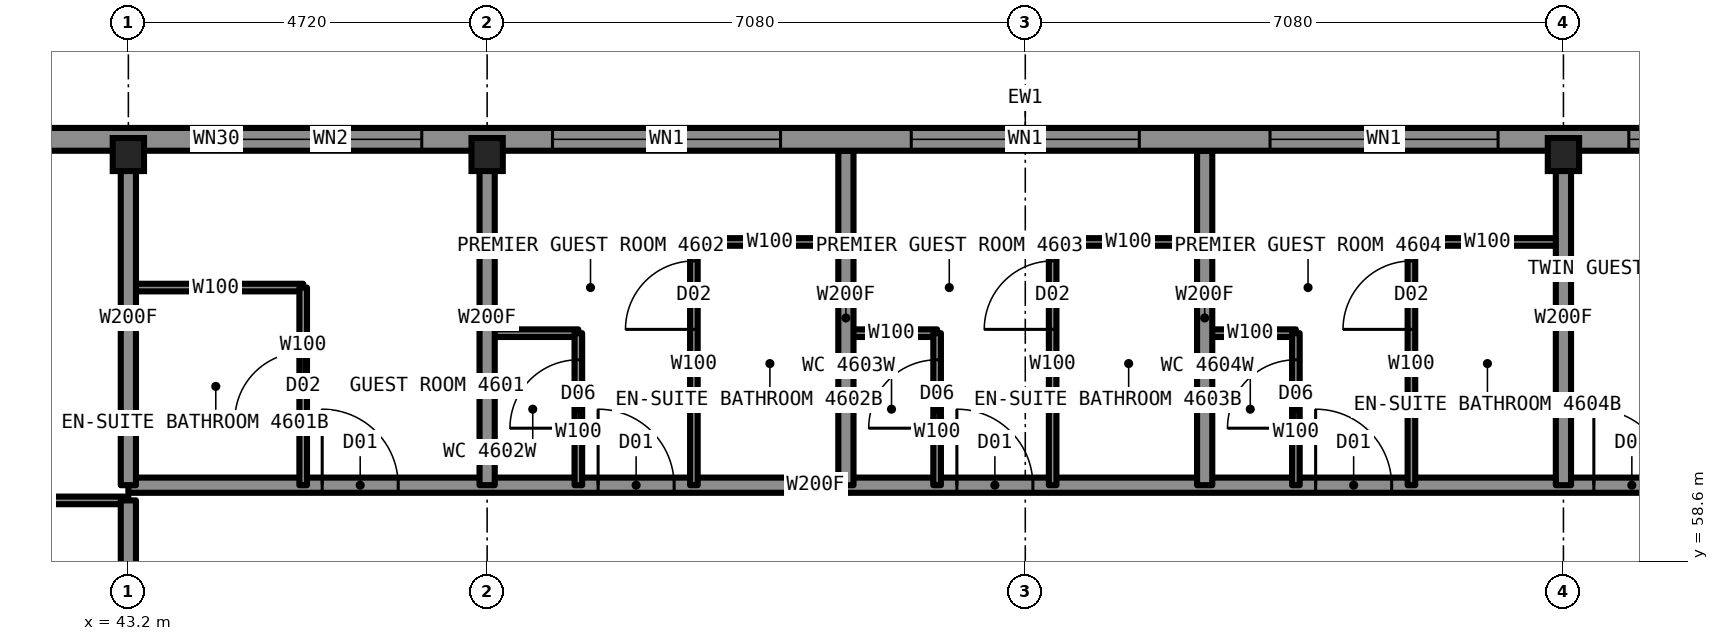
"""IFC4 building model, lengths in metres.
Left out: names, types, materials, properties, quantities, classifications, styles, units other than length and angle.
Written with IfcOpenShell. Run it as: python <this file> out.ifc"""

import sys

from ifc_helpers import new_model, si_unit, direction, frame, frame_2d, origin, origin_2d, place, context, subcontext, project, spatial, rectangle, i_section, extrude, element, fill, save


model = new_model("IFC4")
c1 = context("Model", 3, precision=1e-05, world=origin(), true_north=direction((0.0, 1.0)))
c2 = subcontext(c1, "Body", "Model", "MODEL_VIEW")
j1 = project(units=[si_unit("LENGTHUNIT", "METRE"), si_unit("PLANEANGLEUNIT", "RADIAN")], contexts=[c1])
p1 = place(None, origin())
s1 = spatial("IfcSite", under=j1, at=p1, CompositionType="ELEMENT")
p2 = place(p1, origin())
s2 = spatial("IfcBuilding", under=s1, at=p2, CompositionType="ELEMENT")
p3 = place(p2, frame((0.0, 0.0, 172.3)))
s3 = spatial("IfcBuildingStorey", under=s2, at=p3, CompositionType="ELEMENT", Elevation=172.3)
for number, where, z_axis, x_axis in (
    (1, (43.2, 63.95, 0.0), (0.0, 0.0, 1.0), (1.0, 0.0, 0.0)),
    (2, (47.92, 63.95, 0.0), (0.0, 0.0, 1.0), (1.0, 0.0, 0.0)),
    (3, (62.08, 63.95, 0.0), (0.0, 0.0, 1.0), (1.0, 0.0, 0.0)),
):
    element("IfcColumn", number, at=place(p3, frame(where, z_axis=z_axis, x_axis=x_axis)), inside=s3, PredefinedType="COLUMN", context=c2, shape_type="SweptSolid", body=[
        extrude(i_section(OverallWidth=0.411, OverallDepth=0.434, WebThickness=0.036, FlangeThickness=0.057, at=origin_2d()), origin(), (0.0, 0.0, 1.0), 3.5),
    ])
p4 = place(p3, frame((40.6, 59.4, 0.0), z_axis=(0.0, 0.0, 1.0), x_axis=(1.0, 0.0, 0.0)))
e4 = element("IfcWall", 4, at=p4, inside=s3, PredefinedType="PARTITIONING", context=c2, shape_type="SweptSolid", body=[
    extrude(rectangle(XDim=2.6, YDim=0.1, at=frame_2d((1.3, 0.0))), origin(), (0.0, 0.0, 1.0), 3.33),
])
p5 = place(p3, frame((43.2, 59.6, 0.0), z_axis=(0.0, 0.0, 1.0), x_axis=(1.0, 0.0, 0.0)))
e5 = element("IfcWall", 5, at=p5, inside=s3, PredefinedType="PARTITIONING", context=c2, shape_type="SweptSolid", body=[
    extrude(rectangle(XDim=23.6, YDim=0.2, at=frame_2d((11.8, 0.0))), origin(), (0.0, 0.0, 1.0), 3.33),
])
p6 = place(p5, frame((2.55, 0.0, 0.0)))
e6 = element("IfcOpeningElement", 6, at=p6, cuts=e5, PredefinedType="OPENING", context=c2, shape_type="SweptSolid", body=[
    extrude(rectangle(XDim=1.0, YDim=2.2, at=frame_2d((0.5, 1.1))), frame((0.0, 0.11, 0.0), z_axis=(0.0, -1.0, 0.0), x_axis=(1.0, 0.0, 0.0)), (0.0, 0.0, 1.0), 0.22),
])
p7 = place(p5, frame((6.18, 0.0, 0.0)))
e7 = element("IfcOpeningElement", 7, at=p7, cuts=e5, PredefinedType="OPENING", context=c2, shape_type="SweptSolid", body=[
    extrude(rectangle(XDim=1.0, YDim=2.2, at=frame_2d((0.5, 1.1))), frame((0.0, 0.11, 0.0), z_axis=(0.0, -1.0, 0.0), x_axis=(1.0, 0.0, 0.0)), (0.0, 0.0, 1.0), 0.22),
])
p8 = place(p5, frame((10.9, 0.0, 0.0)))
e8 = element("IfcOpeningElement", 8, at=p8, cuts=e5, PredefinedType="OPENING", context=c2, shape_type="SweptSolid", body=[
    extrude(rectangle(XDim=1.0, YDim=2.2, at=frame_2d((0.5, 1.1))), frame((0.0, 0.11, 0.0), z_axis=(0.0, -1.0, 0.0), x_axis=(1.0, 0.0, 0.0)), (0.0, 0.0, 1.0), 0.22),
])
p9 = place(p5, frame((15.62, 0.0, 0.0)))
e9 = element("IfcOpeningElement", 9, at=p9, cuts=e5, PredefinedType="OPENING", context=c2, shape_type="SweptSolid", body=[
    extrude(rectangle(XDim=1.0, YDim=2.2, at=frame_2d((0.5, 1.1))), frame((0.0, 0.11, 0.0), z_axis=(0.0, -1.0, 0.0), x_axis=(1.0, 0.0, 0.0)), (0.0, 0.0, 1.0), 0.22),
])
p10 = place(p5, frame((19.28, 0.0, 0.0)))
e10 = element("IfcOpeningElement", 10, at=p10, cuts=e5, PredefinedType="OPENING", context=c2, shape_type="SweptSolid", body=[
    extrude(rectangle(XDim=1.0, YDim=2.2, at=frame_2d((0.5, 1.1))), frame((0.0, 0.11, 0.0), z_axis=(0.0, -1.0, 0.0), x_axis=(1.0, 0.0, 0.0)), (0.0, 0.0, 1.0), 0.22),
])
for number, where, z_axis, x_axis in (
    (11, (47.92, 61.6, 0.0), (0.0, 0.0, 1.0), (1.0, 0.0, 0.0)),
    (12, (52.64, 61.6, 0.0), (0.0, 0.0, 1.0), (1.0, 0.0, 0.0)),
):
    element("IfcWall", number, at=place(p3, frame(where, z_axis=z_axis, x_axis=x_axis)), inside=s3, PredefinedType="PARTITIONING", context=c2, shape_type="SweptSolid", body=[
        extrude(rectangle(XDim=1.2, YDim=0.1, at=frame_2d((0.6, 0.0))), origin(), (0.0, 0.0, 1.0), 3.33),
    ])
p11 = place(p3, frame((57.36, 61.6, 0.0), z_axis=(0.0, 0.0, 1.0), x_axis=(1.0, 0.0, 0.0)))
e13 = element("IfcWall", 13, at=p11, inside=s3, PredefinedType="PARTITIONING", context=c2, shape_type="SweptSolid", body=[
    extrude(rectangle(XDim=1.2, YDim=0.1, at=frame_2d((0.6, 0.0))), origin(), (0.0, 0.0, 1.0), 3.33),
])
p12 = place(p3, frame((43.2, 62.2, 0.0), z_axis=(0.0, 0.0, 1.0), x_axis=(1.0, 0.0, 0.0)))
e14 = element("IfcWall", 14, at=p12, inside=s3, PredefinedType="PARTITIONING", context=c2, shape_type="SweptSolid", body=[
    extrude(rectangle(XDim=2.3, YDim=0.1, at=frame_2d((1.15, 0.0))), origin(), (0.0, 0.0, 1.0), 3.33),
])
for number, where, z_axis, x_axis in (
    (15, (50.64, 62.8, 0.0), (0.0, 0.0, 1.0), (1.0, 0.0, 0.0)),
    (16, (55.36, 62.8, 0.0), (0.0, 0.0, 1.0), (1.0, 0.0, 0.0)),
    (17, (60.08, 62.8, 0.0), (0.0, 0.0, 1.0), (1.0, 0.0, 0.0)),
):
    element("IfcWall", number, at=place(p3, frame(where, z_axis=z_axis, x_axis=x_axis)), inside=s3, PredefinedType="PARTITIONING", context=c2, shape_type="SweptSolid", body=[
        extrude(rectangle(XDim=2.0, YDim=0.1, at=frame_2d((1.0, 0.0))), origin(), (0.0, 0.0, 1.0), 3.33),
    ])
p13 = place(p3, frame((53.84, 59.6, 0.0), z_axis=(0.0, 0.0, 1.0), x_axis=(0.0, 1.0, 0.0)))
e18 = element("IfcWall", 18, at=p13, inside=s3, PredefinedType="PARTITIONING", context=c2, shape_type="SweptSolid", body=[
    extrude(rectangle(XDim=2.0, YDim=0.1, at=frame_2d((1.0, 0.0))), origin(), (0.0, 0.0, 1.0), 3.33),
])
p14 = place(p13, frame((0.75, 0.0, 0.0)))
e19 = element("IfcOpeningElement", 19, at=p14, cuts=e18, PredefinedType="OPENING", context=c2, shape_type="SweptSolid", body=[
    extrude(rectangle(XDim=0.9, YDim=2.1, at=frame_2d((0.45, 1.05))), frame((0.0, 0.06, 0.0), z_axis=(0.0, -1.0, 0.0), x_axis=(1.0, 0.0, 0.0)), (0.0, 0.0, 1.0), 0.12),
])
p15 = place(p3, frame((43.2, 59.6, 0.0), z_axis=(0.0, 0.0, 1.0), x_axis=(0.0, 1.0, 0.0)))
e20 = element("IfcWall", 20, at=p15, inside=s3, PredefinedType="PARTITIONING", context=c2, shape_type="SweptSolid", body=[
    extrude(rectangle(XDim=4.4, YDim=0.2, at=frame_2d((2.2, 0.0))), origin(), (0.0, 0.0, 1.0), 2.573),
])
p16 = place(p3, frame((52.64, 59.6, 0.0), z_axis=(0.0, 0.0, 1.0), x_axis=(0.0, 1.0, 0.0)))
e21 = element("IfcWall", 21, at=p16, inside=s3, PredefinedType="PARTITIONING", context=c2, shape_type="SweptSolid", body=[
    extrude(rectangle(XDim=4.4, YDim=0.2, at=frame_2d((2.2, 0.0))), origin(), (0.0, 0.0, 1.0), 3.33),
])
p17 = place(p3, frame((50.64, 59.6, 0.0), z_axis=(0.0, 0.0, 1.0), x_axis=(0.0, 1.0, 0.0)))
e22 = element("IfcWall", 22, at=p17, inside=s3, PredefinedType="PARTITIONING", context=c2, shape_type="SweptSolid", body=[
    extrude(rectangle(XDim=3.2, YDim=0.1, at=frame_2d((1.6, 0.0))), origin(), (0.0, 0.0, 1.0), 3.33),
])
p18 = place(p17, frame((2.05, 0.0, 0.0)))
e23 = element("IfcOpeningElement", 23, at=p18, cuts=e22, PredefinedType="OPENING", context=c2, shape_type="SweptSolid", body=[
    extrude(rectangle(XDim=0.9, YDim=2.1, at=frame_2d((0.45, 1.05))), frame((0.0, 0.06, 0.0), z_axis=(0.0, -1.0, 0.0), x_axis=(1.0, 0.0, 0.0)), (0.0, 0.0, 1.0), 0.12),
])
p19 = place(p3, frame((49.12, 59.6, 0.0), z_axis=(0.0, 0.0, 1.0), x_axis=(0.0, 1.0, 0.0)))
e24 = element("IfcWall", 24, at=p19, inside=s3, PredefinedType="PARTITIONING", context=c2, shape_type="SweptSolid", body=[
    extrude(rectangle(XDim=2.0, YDim=0.1, at=frame_2d((1.0, 0.0))), origin(), (0.0, 0.0, 1.0), 3.33),
])
p20 = place(p19, frame((0.75, 0.0, 0.0)))
e25 = element("IfcOpeningElement", 25, at=p20, cuts=e24, PredefinedType="OPENING", context=c2, shape_type="SweptSolid", body=[
    extrude(rectangle(XDim=0.9, YDim=2.1, at=frame_2d((0.45, 1.05))), frame((0.0, 0.06, 0.0), z_axis=(0.0, -1.0, 0.0), x_axis=(1.0, 0.0, 0.0)), (0.0, 0.0, 1.0), 0.12),
])
p21 = place(p3, frame((47.92, 59.6, 0.0), z_axis=(0.0, 0.0, 1.0), x_axis=(0.0, 1.0, 0.0)))
e26 = element("IfcWall", 26, at=p21, inside=s3, PredefinedType="PARTITIONING", context=c2, shape_type="SweptSolid", body=[
    extrude(rectangle(XDim=4.4, YDim=0.2, at=frame_2d((2.2, 0.0))), origin(), (0.0, 0.0, 1.0), 2.573),
])
p22 = place(p3, frame((45.5, 59.6, 0.0), z_axis=(0.0, 0.0, 1.0), x_axis=(0.0, 1.0, 0.0)))
e27 = element("IfcWall", 27, at=p22, inside=s3, PredefinedType="PARTITIONING", context=c2, shape_type="SweptSolid", body=[
    extrude(rectangle(XDim=2.6, YDim=0.1, at=frame_2d((1.3, 0.0))), origin(), (0.0, 0.0, 1.0), 3.33),
])
p23 = place(p22, frame((0.85, 0.0, 0.0)))
e28 = element("IfcOpeningElement", 28, at=p23, cuts=e27, PredefinedType="OPENING", context=c2, shape_type="SweptSolid", body=[
    extrude(rectangle(XDim=0.9, YDim=2.1, at=frame_2d((0.45, 1.05))), frame((0.0, 0.06, 0.0), z_axis=(0.0, -1.0, 0.0), x_axis=(1.0, 0.0, 0.0)), (0.0, 0.0, 1.0), 0.12),
])
p24 = place(p3, frame((55.36, 59.6, 0.0), z_axis=(0.0, 0.0, 1.0), x_axis=(0.0, 1.0, 0.0)))
e29 = element("IfcWall", 29, at=p24, inside=s3, PredefinedType="PARTITIONING", context=c2, shape_type="SweptSolid", body=[
    extrude(rectangle(XDim=3.2, YDim=0.1, at=frame_2d((1.6, 0.0))), origin(), (0.0, 0.0, 1.0), 3.33),
])
p25 = place(p24, frame((2.05, 0.0, 0.0)))
e30 = element("IfcOpeningElement", 30, at=p25, cuts=e29, PredefinedType="OPENING", context=c2, shape_type="SweptSolid", body=[
    extrude(rectangle(XDim=0.9, YDim=2.1, at=frame_2d((0.45, 1.05))), frame((0.0, 0.06, 0.0), z_axis=(0.0, -1.0, 0.0), x_axis=(1.0, 0.0, 0.0)), (0.0, 0.0, 1.0), 0.12),
])
p26 = place(p3, frame((57.36, 59.6, 0.0), z_axis=(0.0, 0.0, 1.0), x_axis=(0.0, 1.0, 0.0)))
e31 = element("IfcWall", 31, at=p26, inside=s3, PredefinedType="PARTITIONING", context=c2, shape_type="SweptSolid", body=[
    extrude(rectangle(XDim=4.4, YDim=0.2, at=frame_2d((2.2, 0.0))), origin(), (0.0, 0.0, 1.0), 3.33),
])
p27 = place(p3, frame((58.56, 59.6, 0.0), z_axis=(0.0, 0.0, 1.0), x_axis=(0.0, 1.0, 0.0)))
e32 = element("IfcWall", 32, at=p27, inside=s3, PredefinedType="PARTITIONING", context=c2, shape_type="SweptSolid", body=[
    extrude(rectangle(XDim=2.0, YDim=0.1, at=frame_2d((1.0, 0.0))), origin(), (0.0, 0.0, 1.0), 3.33),
])
p28 = place(p27, frame((0.75, 0.0, 0.0)))
e33 = element("IfcOpeningElement", 33, at=p28, cuts=e32, PredefinedType="OPENING", context=c2, shape_type="SweptSolid", body=[
    extrude(rectangle(XDim=0.9, YDim=2.1, at=frame_2d((0.45, 1.05))), frame((0.0, 0.06, 0.0), z_axis=(0.0, -1.0, 0.0), x_axis=(1.0, 0.0, 0.0)), (0.0, 0.0, 1.0), 0.12),
])
p29 = place(p3, frame((60.08, 59.6, 0.0), z_axis=(0.0, 0.0, 1.0), x_axis=(0.0, 1.0, 0.0)))
e34 = element("IfcWall", 34, at=p29, inside=s3, PredefinedType="PARTITIONING", context=c2, shape_type="SweptSolid", body=[
    extrude(rectangle(XDim=3.2, YDim=0.1, at=frame_2d((1.6, 0.0))), origin(), (0.0, 0.0, 1.0), 3.33),
])
p30 = place(p29, frame((2.05, 0.0, 0.0)))
e35 = element("IfcOpeningElement", 35, at=p30, cuts=e34, PredefinedType="OPENING", context=c2, shape_type="SweptSolid", body=[
    extrude(rectangle(XDim=0.9, YDim=2.1, at=frame_2d((0.45, 1.05))), frame((0.0, 0.06, 0.0), z_axis=(0.0, -1.0, 0.0), x_axis=(1.0, 0.0, 0.0)), (0.0, 0.0, 1.0), 0.12),
])
p31 = place(p3, frame((62.08, 59.6, 0.0), z_axis=(0.0, 0.0, 1.0), x_axis=(0.0, 1.0, 0.0)))
e36 = element("IfcWall", 36, at=p31, inside=s3, PredefinedType="PARTITIONING", context=c2, shape_type="SweptSolid", body=[
    extrude(rectangle(XDim=4.4, YDim=0.2, at=frame_2d((2.2, 0.0))), origin(), (0.0, 0.0, 1.0), 2.573),
])
p32 = place(p3, frame((68.8, 64.15, 0.0), z_axis=(0.0, 0.0, 1.0), x_axis=(-1.0, 0.0, 0.0)))
e37 = element("IfcWall", 37, at=p32, inside=s3, PredefinedType="SOLIDWALL", context=c2, shape_type="SweptSolid", body=[
    extrude(rectangle(XDim=27.6, YDim=0.3, at=frame_2d((13.8, 0.0))), origin(), (0.0, 0.0, 1.0), 2.83),
])
p33 = place(p32, frame((3.46, 0.0, 0.3)))
e38 = element("IfcOpeningElement", 38, at=p33, cuts=e37, PredefinedType="OPENING", context=c2, shape_type="SweptSolid", body=[
    extrude(rectangle(XDim=2.4, YDim=2.0, at=frame_2d((1.2, 1.0))), frame((0.0, 0.16, 0.0), z_axis=(0.0, -1.0, 0.0), x_axis=(1.0, 0.0, 0.0)), (0.0, 0.0, 1.0), 0.32),
])
p34 = place(p32, frame((7.58, 0.0, 0.3)))
e39 = element("IfcOpeningElement", 39, at=p34, cuts=e37, PredefinedType="OPENING", context=c2, shape_type="SweptSolid", body=[
    extrude(rectangle(XDim=3.0, YDim=2.0, at=frame_2d((1.5, 1.0))), frame((0.0, 0.16, 0.0), z_axis=(0.0, -1.0, 0.0), x_axis=(1.0, 0.0, 0.0)), (0.0, 0.0, 1.0), 0.32),
])
p35 = place(p32, frame((12.3, 0.0, 0.3)))
e40 = element("IfcOpeningElement", 40, at=p35, cuts=e37, PredefinedType="OPENING", context=c2, shape_type="SweptSolid", body=[
    extrude(rectangle(XDim=3.0, YDim=2.0, at=frame_2d((1.5, 1.0))), frame((0.0, 0.16, 0.0), z_axis=(0.0, -1.0, 0.0), x_axis=(1.0, 0.0, 0.0)), (0.0, 0.0, 1.0), 0.32),
])
p36 = place(p32, frame((17.02, 0.0, 0.3)))
e41 = element("IfcOpeningElement", 41, at=p36, cuts=e37, PredefinedType="OPENING", context=c2, shape_type="SweptSolid", body=[
    extrude(rectangle(XDim=3.0, YDim=2.0, at=frame_2d((1.5, 1.0))), frame((0.0, 0.16, 0.0), z_axis=(0.0, -1.0, 0.0), x_axis=(1.0, 0.0, 0.0)), (0.0, 0.0, 1.0), 0.32),
])
p37 = place(p32, frame((21.74, 0.0, 0.3)))
e42 = element("IfcOpeningElement", 42, at=p37, cuts=e37, PredefinedType="OPENING", context=c2, shape_type="SweptSolid", body=[
    extrude(rectangle(XDim=2.4, YDim=2.0, at=frame_2d((1.2, 1.0))), frame((0.0, 0.16, 0.0), z_axis=(0.0, -1.0, 0.0), x_axis=(1.0, 0.0, 0.0)), (0.0, 0.0, 1.0), 0.32),
])
p38 = place(p32, frame((2.86, 0.0, 0.3)))
e43 = element("IfcOpeningElement", 43, at=p38, cuts=e37, PredefinedType="OPENING", context=c2, shape_type="SweptSolid", body=[
    extrude(rectangle(XDim=0.6, YDim=1.1, at=frame_2d((0.3, 0.55))), frame((0.0, 0.16, 0.0), z_axis=(0.0, -1.0, 0.0), x_axis=(1.0, 0.0, 0.0)), (0.0, 0.0, 1.0), 0.32),
])
p39 = place(p32, frame((24.14, 0.0, 0.3)))
e44 = element("IfcOpeningElement", 44, at=p39, cuts=e37, PredefinedType="OPENING", context=c2, shape_type="SweptSolid", body=[
    extrude(rectangle(XDim=0.6, YDim=1.1, at=frame_2d((0.3, 0.55))), frame((0.0, 0.16, 0.0), z_axis=(0.0, -1.0, 0.0), x_axis=(1.0, 0.0, 0.0)), (0.0, 0.0, 1.0), 0.32),
])
p40 = place(p3, frame((43.2, 56.78, 0.0), z_axis=(0.0, 0.0, 1.0), x_axis=(0.0, 1.0, 0.0)))
e45 = element("IfcWall", 45, at=p40, inside=s3, PredefinedType="PARTITIONING", context=c2, shape_type="SweptSolid", body=[
    extrude(rectangle(XDim=2.62, YDim=0.2, at=frame_2d((1.31, 0.0))), origin(), (0.0, 0.0, 1.0), 2.573),
])
p41 = place(p6, origin())
e46 = element("IfcDoor", 46, at=p41, inside=s3, OperationType="SINGLE_SWING_LEFT", PredefinedType="DOOR", context=c2, shape_type="SweptSolid", body=[
    extrude(rectangle(XDim=1.0, YDim=2.2, at=frame_2d((0.5, 1.1))), frame((0.0, 0.025, 0.0), z_axis=(0.0, -1.0, 0.0), x_axis=(1.0, 0.0, 0.0)), (0.0, 0.0, 1.0), 0.05),
])
fill(e6, e46)
p42 = place(p23, origin())
e47 = element("IfcDoor", 47, at=p42, inside=s3, OperationType="SINGLE_SWING_RIGHT", PredefinedType="DOOR", context=c2, shape_type="SweptSolid", body=[
    extrude(rectangle(XDim=0.9, YDim=2.1, at=frame_2d((0.45, 1.05))), frame((0.0, 0.025, 0.0), z_axis=(0.0, -1.0, 0.0), x_axis=(1.0, 0.0, 0.0)), (0.0, 0.0, 1.0), 0.05),
])
fill(e28, e47)
p43 = place(p7, origin())
e48 = element("IfcDoor", 48, at=p43, inside=s3, OperationType="SINGLE_SWING_LEFT", PredefinedType="DOOR", context=c2, shape_type="SweptSolid", body=[
    extrude(rectangle(XDim=1.0, YDim=2.2, at=frame_2d((0.5, 1.1))), frame((0.0, 0.025, 0.0), z_axis=(0.0, -1.0, 0.0), x_axis=(1.0, 0.0, 0.0)), (0.0, 0.0, 1.0), 0.05),
])
fill(e7, e48)
p44 = place(p18, origin())
e49 = element("IfcDoor", 49, at=p44, inside=s3, OperationType="SINGLE_SWING_RIGHT", PredefinedType="DOOR", context=c2, shape_type="SweptSolid", body=[
    extrude(rectangle(XDim=0.9, YDim=2.1, at=frame_2d((0.45, 1.05))), frame((0.0, 0.025, 0.0), z_axis=(0.0, -1.0, 0.0), x_axis=(1.0, 0.0, 0.0)), (0.0, 0.0, 1.0), 0.05),
])
fill(e23, e49)
p45 = place(p20, origin())
e50 = element("IfcDoor", 50, at=p45, inside=s3, OperationType="SINGLE_SWING_LEFT", PredefinedType="DOOR", context=c2, shape_type="SweptSolid", body=[
    extrude(rectangle(XDim=0.9, YDim=2.1, at=frame_2d((0.45, 1.05))), frame((0.0, 0.025, 0.0), z_axis=(0.0, -1.0, 0.0), x_axis=(1.0, 0.0, 0.0)), (0.0, 0.0, 1.0), 0.05),
])
fill(e25, e50)
p46 = place(p8, origin())
e51 = element("IfcDoor", 51, at=p46, inside=s3, OperationType="SINGLE_SWING_LEFT", PredefinedType="DOOR", context=c2, shape_type="SweptSolid", body=[
    extrude(rectangle(XDim=1.0, YDim=2.2, at=frame_2d((0.5, 1.1))), frame((0.0, 0.025, 0.0), z_axis=(0.0, -1.0, 0.0), x_axis=(1.0, 0.0, 0.0)), (0.0, 0.0, 1.0), 0.05),
])
fill(e8, e51)
p47 = place(p25, origin())
e52 = element("IfcDoor", 52, at=p47, inside=s3, OperationType="SINGLE_SWING_RIGHT", PredefinedType="DOOR", context=c2, shape_type="SweptSolid", body=[
    extrude(rectangle(XDim=0.9, YDim=2.1, at=frame_2d((0.45, 1.05))), frame((0.0, 0.025, 0.0), z_axis=(0.0, -1.0, 0.0), x_axis=(1.0, 0.0, 0.0)), (0.0, 0.0, 1.0), 0.05),
])
fill(e30, e52)
p48 = place(p14, origin())
e53 = element("IfcDoor", 53, at=p48, inside=s3, OperationType="SINGLE_SWING_LEFT", PredefinedType="DOOR", context=c2, shape_type="SweptSolid", body=[
    extrude(rectangle(XDim=0.9, YDim=2.1, at=frame_2d((0.45, 1.05))), frame((0.0, 0.025, 0.0), z_axis=(0.0, -1.0, 0.0), x_axis=(1.0, 0.0, 0.0)), (0.0, 0.0, 1.0), 0.05),
])
fill(e19, e53)
p49 = place(p9, origin())
e54 = element("IfcDoor", 54, at=p49, inside=s3, OperationType="SINGLE_SWING_LEFT", PredefinedType="DOOR", context=c2, shape_type="SweptSolid", body=[
    extrude(rectangle(XDim=1.0, YDim=2.2, at=frame_2d((0.5, 1.1))), frame((0.0, 0.025, 0.0), z_axis=(0.0, -1.0, 0.0), x_axis=(1.0, 0.0, 0.0)), (0.0, 0.0, 1.0), 0.05),
])
fill(e9, e54)
p50 = place(p30, origin())
e55 = element("IfcDoor", 55, at=p50, inside=s3, OperationType="SINGLE_SWING_RIGHT", PredefinedType="DOOR", context=c2, shape_type="SweptSolid", body=[
    extrude(rectangle(XDim=0.9, YDim=2.1, at=frame_2d((0.45, 1.05))), frame((0.0, 0.025, 0.0), z_axis=(0.0, -1.0, 0.0), x_axis=(1.0, 0.0, 0.0)), (0.0, 0.0, 1.0), 0.05),
])
fill(e35, e55)
p51 = place(p28, origin())
e56 = element("IfcDoor", 56, at=p51, inside=s3, OperationType="SINGLE_SWING_LEFT", PredefinedType="DOOR", context=c2, shape_type="SweptSolid", body=[
    extrude(rectangle(XDim=0.9, YDim=2.1, at=frame_2d((0.45, 1.05))), frame((0.0, 0.025, 0.0), z_axis=(0.0, -1.0, 0.0), x_axis=(1.0, 0.0, 0.0)), (0.0, 0.0, 1.0), 0.05),
])
fill(e33, e56)
p52 = place(p10, origin())
e57 = element("IfcDoor", 57, at=p52, inside=s3, OperationType="SINGLE_SWING_LEFT", PredefinedType="DOOR", context=c2, shape_type="SweptSolid", body=[
    extrude(rectangle(XDim=1.0, YDim=2.2, at=frame_2d((0.5, 1.1))), frame((0.0, 0.025, 0.0), z_axis=(0.0, -1.0, 0.0), x_axis=(1.0, 0.0, 0.0)), (0.0, 0.0, 1.0), 0.05),
])
fill(e10, e57)
p53 = place(p33, origin())
e58 = element("IfcWindow", 58, at=p53, inside=s3, PartitioningType="SINGLE_PANEL", PredefinedType="WINDOW", context=c2, shape_type="SweptSolid", body=[
    extrude(rectangle(XDim=2.4, YDim=2.0, at=frame_2d((1.2, 1.0))), frame((0.0, 0.13, 0.0), z_axis=(0.0, -1.0, 0.0), x_axis=(1.0, 0.0, 0.0)), (0.0, 0.0, 1.0), 0.06),
])
fill(e38, e58)
p54 = place(p34, origin())
e59 = element("IfcWindow", 59, at=p54, inside=s3, PartitioningType="SINGLE_PANEL", PredefinedType="WINDOW", context=c2, shape_type="SweptSolid", body=[
    extrude(rectangle(XDim=3.0, YDim=2.0, at=frame_2d((1.5, 1.0))), frame((0.0, 0.13, 0.0), z_axis=(0.0, -1.0, 0.0), x_axis=(1.0, 0.0, 0.0)), (0.0, 0.0, 1.0), 0.06),
])
fill(e39, e59)
p55 = place(p35, origin())
e60 = element("IfcWindow", 60, at=p55, inside=s3, PartitioningType="SINGLE_PANEL", PredefinedType="WINDOW", context=c2, shape_type="SweptSolid", body=[
    extrude(rectangle(XDim=3.0, YDim=2.0, at=frame_2d((1.5, 1.0))), frame((0.0, 0.13, 0.0), z_axis=(0.0, -1.0, 0.0), x_axis=(1.0, 0.0, 0.0)), (0.0, 0.0, 1.0), 0.06),
])
fill(e40, e60)
p56 = place(p36, origin())
e61 = element("IfcWindow", 61, at=p56, inside=s3, PartitioningType="SINGLE_PANEL", PredefinedType="WINDOW", context=c2, shape_type="SweptSolid", body=[
    extrude(rectangle(XDim=3.0, YDim=2.0, at=frame_2d((1.5, 1.0))), frame((0.0, 0.13, 0.0), z_axis=(0.0, -1.0, 0.0), x_axis=(1.0, 0.0, 0.0)), (0.0, 0.0, 1.0), 0.06),
])
fill(e41, e61)
p57 = place(p37, origin())
e62 = element("IfcWindow", 62, at=p57, inside=s3, PartitioningType="SINGLE_PANEL", PredefinedType="WINDOW", context=c2, shape_type="SweptSolid", body=[
    extrude(rectangle(XDim=2.4, YDim=2.0, at=frame_2d((1.2, 1.0))), frame((0.0, 0.13, 0.0), z_axis=(0.0, -1.0, 0.0), x_axis=(1.0, 0.0, 0.0)), (0.0, 0.0, 1.0), 0.06),
])
fill(e42, e62)
p58 = place(p39, origin())
e63 = element("IfcWindow", 63, at=p58, inside=s3, PartitioningType="SINGLE_PANEL", PredefinedType="WINDOW", context=c2, shape_type="SweptSolid", body=[
    extrude(rectangle(XDim=0.6, YDim=1.1, at=frame_2d((0.3, 0.55))), frame((0.0, 0.13, 0.0), z_axis=(0.0, -1.0, 0.0), x_axis=(1.0, 0.0, 0.0)), (0.0, 0.0, 1.0), 0.06),
])
fill(e44, e63)
save(model, sys.argv[1])
